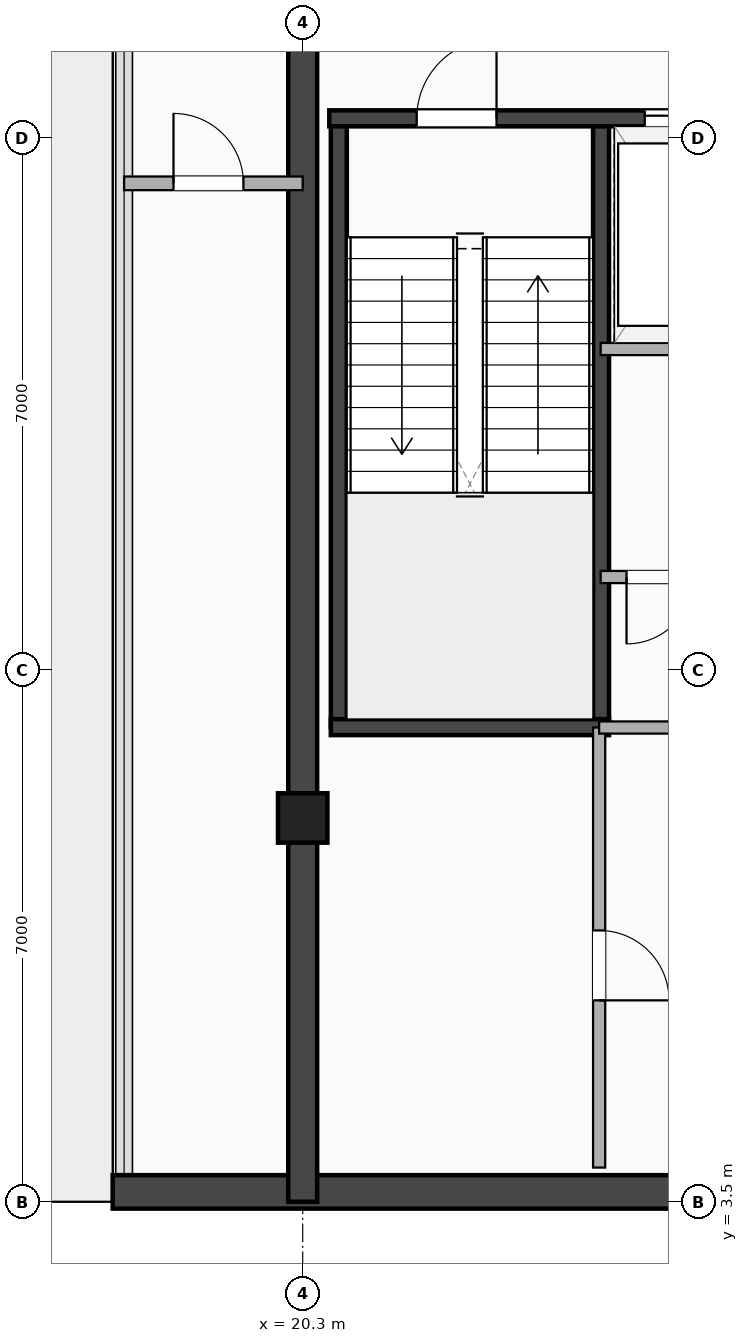
"""IFC4 building model, lengths in metres.
Left out: names, types, materials, properties, quantities, classifications, styles, units other than length and angle.
Written with IfcOpenShell. Run it as: python <this file> out.ifc"""

import sys

from ifc_helpers import new_model, si_unit, direction, frame, frame_2d, origin, origin_2d, place, context, subcontext, project, spatial, rectangle, extrude, element, fill, save


model = new_model("IFC4")
c1 = context("Model", 3, precision=1e-05, world=origin(), true_north=direction((0.0, 1.0)))
c2 = subcontext(c1, "Body", "Model", "MODEL_VIEW")
j1 = project(units=[si_unit("LENGTHUNIT", "METRE"), si_unit("PLANEANGLEUNIT", "RADIAN")], contexts=[c1])
p1 = place(None, origin())
s1 = spatial("IfcSite", under=j1, at=p1, CompositionType="ELEMENT")
p2 = place(p1, origin())
s2 = spatial("IfcBuilding", under=s1, at=p2, CompositionType="ELEMENT")
p3 = place(p2, frame((0.0, 0.0, 303.3)))
s3 = spatial("IfcBuildingStorey", under=s2, at=p3, CompositionType="ELEMENT", Elevation=303.3)
p4 = place(p3, frame((17.8, 3.63, 0.0), z_axis=(0.0, 0.0, 1.0), x_axis=(1.0, 0.0, 0.0)))
e1 = element("IfcWall", 1, at=p4, inside=s3, PredefinedType="SHEAR", context=c2, shape_type="SweptSolid", body=[
    extrude(rectangle(XDim=27.75, YDim=0.44, at=frame_2d((13.875, 0.0))), origin(), (0.0, 0.0, 1.0), 4.3),
])
p5 = place(p3, frame((20.3, 3.5, 0.0), z_axis=(0.0, 0.0, 1.0), x_axis=(0.0, 1.0, 0.0)))
e2 = element("IfcWall", 2, at=p5, inside=s3, PredefinedType="SHEAR", context=c2, shape_type="SweptSolid", body=[
    extrude(rectangle(XDim=16.9, YDim=0.38, at=frame_2d((8.45, 0.0))), origin(), (0.0, 0.0, 1.0), 4.3),
])
for number, where, z_axis, x_axis in (
    (3, (20.775, 9.745, 0.0), (0.0, 0.0, 1.0), (0.0, 1.0, 0.0)),
    (4, (24.225, 9.745, 0.0), (0.0, 0.0, 1.0), (0.0, 1.0, 0.0)),
):
    element("IfcWall", number, at=place(p3, frame(where, z_axis=z_axis, x_axis=x_axis)), inside=s3, PredefinedType="SHEAR", context=c2, shape_type="SweptSolid", body=[
        extrude(rectangle(XDim=8.01, YDim=0.21, at=frame_2d((4.005, 0.0))), origin(), (0.0, 0.0, 1.0), 4.3),
    ])
p6 = place(p3, frame((20.67, 9.745, 0.0), z_axis=(0.0, 0.0, 1.0), x_axis=(1.0, 0.0, 0.0)))
e5 = element("IfcWall", 5, at=p6, inside=s3, PredefinedType="SHEAR", context=c2, shape_type="SweptSolid", body=[
    extrude(rectangle(XDim=3.66, YDim=0.21, at=frame_2d((1.83, 0.0))), origin(), (0.0, 0.0, 1.0), 4.3),
])
p7 = place(p3, frame((20.65, 17.755, 0.0), z_axis=(0.0, 0.0, 1.0), x_axis=(1.0, 0.0, 0.0)))
e6 = element("IfcWall", 6, at=p7, inside=s3, PredefinedType="SHEAR", context=c2, shape_type="SweptSolid", body=[
    extrude(rectangle(XDim=8.3, YDim=0.21, at=frame_2d((4.15, 0.0))), origin(), (0.0, 0.0, 1.0), 4.3),
])
p8 = place(p7, frame((2.2, 0.0, 0.0), z_axis=(0.0, 0.0, 1.0), x_axis=(-1.0, 0.0, 0.0)))
e7 = element("IfcOpeningElement", 7, at=p8, cuts=e6, PredefinedType="OPENING", context=c2, shape_type="SweptSolid", body=[
    extrude(rectangle(XDim=1.05, YDim=2.15, at=frame_2d((0.525, 1.075))), frame((0.0, 0.115, 0.0), z_axis=(0.0, -1.0, 0.0), x_axis=(1.0, 0.0, 0.0)), (0.0, 0.0, 1.0), 0.23),
])
p9 = place(p7, frame((4.15, 0.0, 0.0)))
e8 = element("IfcOpeningElement", 8, at=p9, cuts=e6, PredefinedType="OPENING", context=c2, shape_type="SweptSolid", body=[
    extrude(rectangle(XDim=1.1, YDim=2.18, at=frame_2d((0.55, 1.09))), frame((0.0, 0.115, 0.0), z_axis=(0.0, -1.0, 0.0), x_axis=(1.0, 0.0, 0.0)), (0.0, 0.0, 1.0), 0.23),
])
p10 = place(p3, frame((20.3, 8.55, -0.3), z_axis=(0.0, 0.0, 1.0), x_axis=(1.0, 0.0, 0.0)))
e9 = element("IfcColumn", 9, at=p10, inside=s3, PredefinedType="COLUMN", context=c2, shape_type="SweptSolid", body=[
    extrude(rectangle(XDim=0.65, YDim=0.65, at=origin_2d()), origin(), (0.0, 0.0, 1.0), 4.6),
])
p11 = place(p3, frame((24.22, 14.72, 0.0), z_axis=(0.0, 0.0, 1.0), x_axis=(1.0, 0.0, 0.0)))
e10 = element("IfcWall", 10, at=p11, inside=s3, PredefinedType="PARTITIONING", context=c2, shape_type="SweptSolid", body=[
    extrude(rectangle(XDim=4.73, YDim=0.16, at=frame_2d((2.365, 0.0))), origin(), (0.0, 0.0, 1.0), 4.3),
])
p12 = place(p3, frame((24.22, 11.72, 0.0), z_axis=(0.0, 0.0, 1.0), x_axis=(1.0, 0.0, 0.0)))
e11 = element("IfcWall", 11, at=p12, inside=s3, PredefinedType="PARTITIONING", context=c2, shape_type="SweptSolid", body=[
    extrude(rectangle(XDim=1.561, YDim=0.16, at=frame_2d((0.781, 0.0))), origin(), (0.0, 0.0, 1.0), 4.3),
])
p13 = place(p12, frame((0.341, 0.0, 0.0)))
e12 = element("IfcOpeningElement", 12, at=p13, cuts=e11, PredefinedType="OPENING", context=c2, shape_type="SweptSolid", body=[
    extrude(rectangle(XDim=0.88, YDim=2.08, at=frame_2d((0.44, 1.04))), frame((0.0, 0.09, 0.0), z_axis=(0.0, -1.0, 0.0), x_axis=(1.0, 0.0, 0.0)), (0.0, 0.0, 1.0), 0.18),
])
p14 = place(p3, frame((24.2, 3.95, 0.0), z_axis=(0.0, 0.0, 1.0), x_axis=(0.0, 1.0, 0.0)))
e13 = element("IfcWall", 13, at=p14, inside=s3, PredefinedType="PARTITIONING", context=c2, shape_type="SweptSolid", body=[
    extrude(rectangle(XDim=5.79, YDim=0.16, at=frame_2d((2.895, 0.0))), origin(), (0.0, 0.0, 1.0), 3.885),
])
p15 = place(p14, frame((2.2, 0.0, 0.0)))
e14 = element("IfcOpeningElement", 14, at=p15, cuts=e13, PredefinedType="OPENING", context=c2, shape_type="SweptSolid", body=[
    extrude(rectangle(XDim=0.92, YDim=2.08, at=frame_2d((0.46, 1.04))), frame((0.0, 0.09, 0.0), z_axis=(0.0, -1.0, 0.0), x_axis=(1.0, 0.0, 0.0)), (0.0, 0.0, 1.0), 0.18),
])
p16 = place(p3, frame((24.2, 9.74, 0.0), z_axis=(0.0, 0.0, 1.0), x_axis=(1.0, 0.0, 0.0)))
e15 = element("IfcWall", 15, at=p16, inside=s3, PredefinedType="PARTITIONING", context=c2, shape_type="SweptSolid", body=[
    extrude(rectangle(XDim=4.8, YDim=0.16, at=frame_2d((2.4, 0.0))), origin(), (0.0, 0.0, 1.0), 4.3),
])
p17 = place(p16, frame((2.75, 0.0, 0.0), z_axis=(0.0, 0.0, 1.0), x_axis=(-1.0, 0.0, 0.0)))
e16 = element("IfcOpeningElement", 16, at=p17, cuts=e15, PredefinedType="OPENING", context=c2, shape_type="SweptSolid", body=[
    extrude(rectangle(XDim=0.95, YDim=2.15, at=frame_2d((0.475, 1.075))), frame((0.0, 0.09, 0.0), z_axis=(0.0, -1.0, 0.0), x_axis=(1.0, 0.0, 0.0)), (0.0, 0.0, 1.0), 0.18),
])
p18 = place(p3, frame((17.95, 16.9, 0.0), z_axis=(0.0, 0.0, 1.0), x_axis=(1.0, 0.0, 0.0)))
e17 = element("IfcWall", 17, at=p18, inside=s3, PredefinedType="PARTITIONING", context=c2, shape_type="SweptSolid", body=[
    extrude(rectangle(XDim=2.35, YDim=0.18, at=frame_2d((1.175, 0.0))), origin(), (0.0, 0.0, 1.0), 3.885),
])
p19 = place(p18, frame((1.57, 0.0, 0.0), z_axis=(0.0, 0.0, 1.0), x_axis=(-1.0, 0.0, 0.0)))
e18 = element("IfcOpeningElement", 18, at=p19, cuts=e17, PredefinedType="OPENING", context=c2, shape_type="SweptSolid", body=[
    extrude(rectangle(XDim=0.92, YDim=2.08, at=frame_2d((0.46, 1.04))), frame((0.0, 0.1, 0.0), z_axis=(0.0, -1.0, 0.0), x_axis=(1.0, 0.0, 0.0)), (0.0, 0.0, 1.0), 0.2),
])
p20 = place(p8, origin())
e19 = element("IfcDoor", 19, at=p20, inside=s3, OperationType="SINGLE_SWING_RIGHT", PredefinedType="DOOR", context=c2, shape_type="SweptSolid", body=[
    extrude(rectangle(XDim=1.05, YDim=2.15, at=frame_2d((0.525, 1.075))), frame((0.0, 0.025, 0.0), z_axis=(0.0, -1.0, 0.0), x_axis=(1.0, 0.0, 0.0)), (0.0, 0.0, 1.0), 0.05),
])
fill(e7, e19)
p21 = place(p9, origin())
e20 = element("IfcDoor", 20, at=p21, inside=s3, OperationType="DOUBLE_DOOR_SLIDING", PredefinedType="DOOR", context=c2, shape_type="SweptSolid", body=[
    extrude(rectangle(XDim=1.1, YDim=2.18, at=frame_2d((0.55, 1.09))), frame((0.0, 0.025, 0.0), z_axis=(0.0, -1.0, 0.0), x_axis=(1.0, 0.0, 0.0)), (0.0, 0.0, 1.0), 0.05),
])
fill(e8, e20)
p22 = place(p13, origin())
e21 = element("IfcDoor", 21, at=p22, inside=s3, OperationType="SINGLE_SWING_LEFT", PredefinedType="DOOR", context=c2, shape_type="SweptSolid", body=[
    extrude(rectangle(XDim=0.88, YDim=2.08, at=frame_2d((0.44, 1.04))), frame((0.0, 0.025, 0.0), z_axis=(0.0, -1.0, 0.0), x_axis=(1.0, 0.0, 0.0)), (0.0, 0.0, 1.0), 0.05),
])
fill(e12, e21)
p23 = place(p15, origin())
e22 = element("IfcDoor", 22, at=p23, inside=s3, OperationType="SINGLE_SWING_LEFT", PredefinedType="DOOR", context=c2, shape_type="SweptSolid", body=[
    extrude(rectangle(XDim=0.92, YDim=2.08, at=frame_2d((0.46, 1.04))), frame((0.0, 0.025, 0.0), z_axis=(0.0, -1.0, 0.0), x_axis=(1.0, 0.0, 0.0)), (0.0, 0.0, 1.0), 0.05),
])
fill(e14, e22)
p24 = place(p19, origin())
e23 = element("IfcDoor", 23, at=p24, inside=s3, OperationType="SINGLE_SWING_LEFT", PredefinedType="DOOR", context=c2, shape_type="SweptSolid", body=[
    extrude(rectangle(XDim=0.92, YDim=2.08, at=frame_2d((0.46, 1.04))), frame((0.0, 0.025, 0.0), z_axis=(0.0, -1.0, 0.0), x_axis=(1.0, 0.0, 0.0)), (0.0, 0.0, 1.0), 0.05),
])
fill(e18, e23)
save(model, sys.argv[1])
